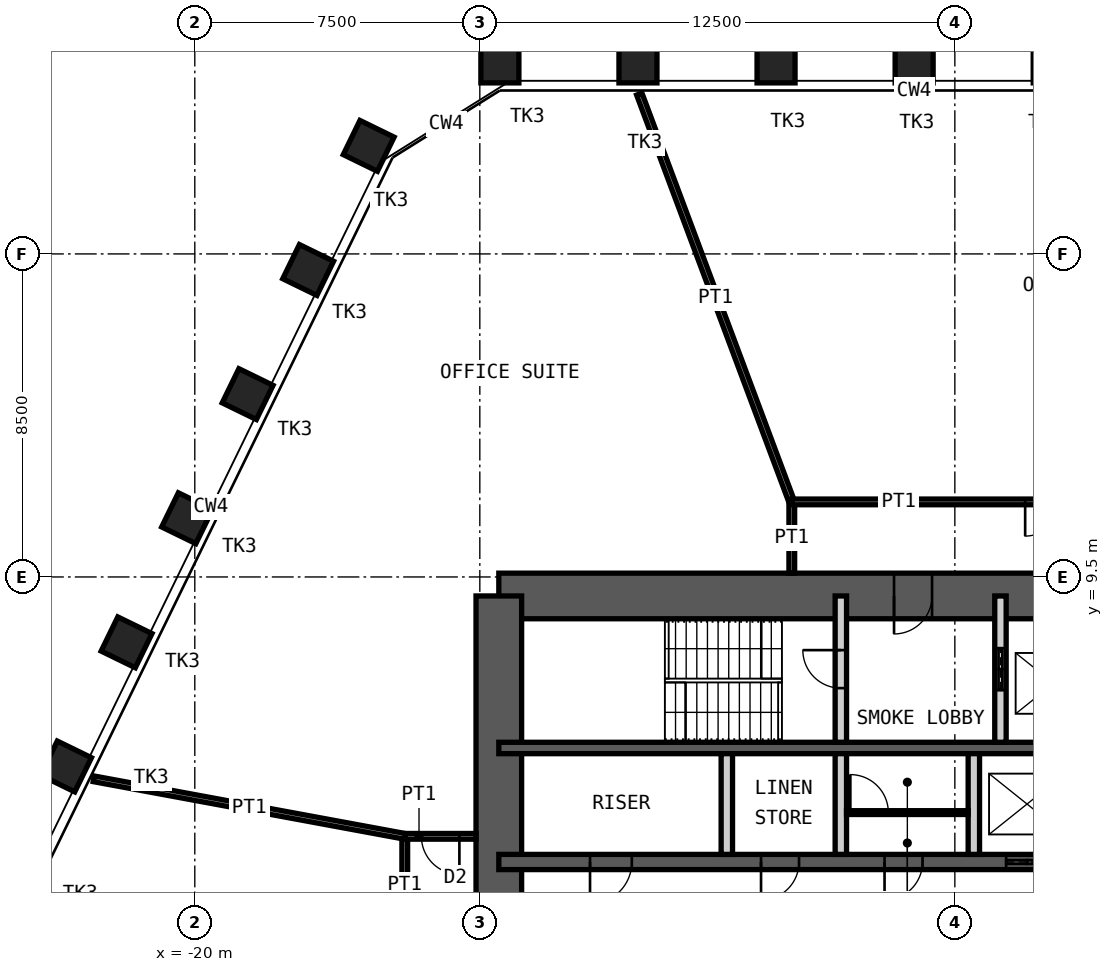
"""IFC4 building model, lengths in metres.
Left out: names, types, materials, properties, quantities, classifications, styles, units other than length and angle.
Written with IfcOpenShell. Run it as: python <this file> out.ifc"""

import sys

from ifc_helpers import new_model, si_unit, direction, frame, frame_2d, origin, origin_2d, place, context, subcontext, project, spatial, rectangle, hollow_rectangle, extrude, element, fill, save


model = new_model("IFC4")
c1 = context("Model", 3, precision=1e-05, world=origin(), true_north=direction((0.0, 1.0)))
c2 = subcontext(c1, "Body", "Model", "MODEL_VIEW")
j1 = project(units=[si_unit("LENGTHUNIT", "METRE"), si_unit("PLANEANGLEUNIT", "RADIAN")], contexts=[c1])
p1 = place(None, origin())
s1 = spatial("IfcSite", under=j1, at=p1, CompositionType="ELEMENT")
p2 = place(p1, origin())
s2 = spatial("IfcBuilding", under=s1, at=p2, CompositionType="ELEMENT")
p3 = place(p2, frame((0.0, 0.0, 251.8)))
s3 = spatial("IfcBuildingStorey", under=s2, at=p3, CompositionType="ELEMENT", Elevation=251.8)
for number, where, z_axis, x_axis in (
    (1, (-11.972, 23.0, 0.0), (0.0, 0.0, 1.0), (-1.0, 0.0, 0.0)),
    (2, (-8.338, 23.0, 0.0), (0.0, 0.0, 1.0), (-1.0, 0.0, 0.0)),
    (3, (-4.705, 23.0, 0.0), (0.0, 0.0, 1.0), (-1.0, 0.0, 0.0)),
    (4, (-1.071, 23.0, 0.0), (0.0, 0.0, 1.0), (-1.0, 0.0, 0.0)),
    (5, (-23.388, 4.514, 0.0), (0.0, 0.0, 1.0), (-0.438, -0.899, 0.0)),
    (6, (-21.795, 7.78, 0.0), (0.0, 0.0, 1.0), (-0.438, -0.899, 0.0)),
    (7, (-20.203, 11.045, 0.0), (0.0, 0.0, 1.0), (-0.438, -0.899, 0.0)),
    (8, (-18.61, 14.311, 0.0), (0.0, 0.0, 1.0), (-0.438, -0.899, 0.0)),
    (9, (-17.017, 17.577, 0.0), (0.0, 0.0, 1.0), (-0.438, -0.899, 0.0)),
    (10, (-15.424, 20.843, 0.0), (0.0, 0.0, 1.0), (-0.438, -0.899, 0.0)),
):
    element("IfcColumn", number, at=place(p3, frame(where, z_axis=z_axis, x_axis=x_axis)), inside=s3, PredefinedType="COLUMN", context=c2, shape_type="SweptSolid", body=[
        extrude(hollow_rectangle(XDim=1.0, YDim=1.0, WallThickness=0.08, at=origin_2d()), origin(), (0.0, 0.0, 1.0), 4.2),
    ])
p4 = place(p3, frame((-12.0, 9.0, 0.0), z_axis=(0.0, 0.0, 1.0), x_axis=(1.0, 0.0, 0.0)))
e11 = element("IfcWall", 11, at=p4, inside=s3, PredefinedType="SHEAR", context=c2, shape_type="SweptSolid", body=[
    extrude(rectangle(XDim=24.0, YDim=1.2, at=frame_2d((12.0, 0.0))), origin(), (0.0, 0.0, 1.0), 4.2),
])
p5 = place(p4, frame((10.4, 0.0, 0.0)))
e12 = element("IfcOpeningElement", 12, at=p5, cuts=e11, PredefinedType="OPENING", context=c2, shape_type="SweptSolid", body=[
    extrude(rectangle(XDim=1.0, YDim=2.1, at=frame_2d((0.5, 1.05))), frame((0.0, 0.61, 0.0), z_axis=(0.0, -1.0, 0.0), x_axis=(1.0, 0.0, 0.0)), (0.0, 0.0, 1.0), 1.22),
])
p6 = place(p4, frame((17.6, 0.0, 0.0)))
e13 = element("IfcOpeningElement", 13, at=p6, cuts=e11, PredefinedType="OPENING", context=c2, shape_type="SweptSolid", body=[
    extrude(rectangle(XDim=0.9, YDim=2.1, at=frame_2d((0.45, 1.05))), frame((0.0, 0.61, 0.0), z_axis=(0.0, -1.0, 0.0), x_axis=(1.0, 0.0, 0.0)), (0.0, 0.0, 1.0), 1.22),
])
p7 = place(p4, frame((21.9, 0.0, 0.0)))
e14 = element("IfcOpeningElement", 14, at=p7, cuts=e11, PredefinedType="OPENING", context=c2, shape_type="SweptSolid", body=[
    extrude(rectangle(XDim=0.9, YDim=2.1, at=frame_2d((0.45, 1.05))), frame((0.0, 0.61, 0.0), z_axis=(0.0, -1.0, 0.0), x_axis=(1.0, 0.0, 0.0)), (0.0, 0.0, 1.0), 1.22),
])
p8 = place(p3, frame((-12.0, -9.0, 0.0), z_axis=(0.0, 0.0, 1.0), x_axis=(0.0, 1.0, 0.0)))
e15 = element("IfcWall", 15, at=p8, inside=s3, PredefinedType="SHEAR", context=c2, shape_type="SweptSolid", body=[
    extrude(rectangle(XDim=18.0, YDim=1.2, at=frame_2d((9.0, 0.0))), origin(), (0.0, 0.0, 1.0), 4.2),
])
p9 = place(p8, frame((8.1, 0.0, 0.0)))
e16 = element("IfcOpeningElement", 16, at=p9, cuts=e15, PredefinedType="OPENING", context=c2, shape_type="SweptSolid", body=[
    extrude(rectangle(XDim=1.8, YDim=2.1, at=frame_2d((0.9, 1.05))), frame((0.0, 0.61, 0.0), z_axis=(0.0, -1.0, 0.0), x_axis=(1.0, 0.0, 0.0)), (0.0, 0.0, 1.0), 1.22),
])
p10 = place(p3, frame((-12.0, 5.0, 0.0), z_axis=(0.0, 0.0, 1.0), x_axis=(1.0, 0.0, 0.0)))
e17 = element("IfcWall", 17, at=p10, inside=s3, PredefinedType="SHEAR", context=c2, shape_type="SweptSolid", body=[
    extrude(rectangle(XDim=24.0, YDim=0.3, at=frame_2d((12.0, 0.0))), origin(), (0.0, 0.0, 1.0), 4.2),
])
p11 = place(p3, frame((-12.0, 2.0, 0.0), z_axis=(0.0, 0.0, 1.0), x_axis=(1.0, 0.0, 0.0)))
e18 = element("IfcWall", 18, at=p11, inside=s3, PredefinedType="SHEAR", context=c2, shape_type="SweptSolid", body=[
    extrude(rectangle(XDim=24.0, YDim=0.4, at=frame_2d((12.0, 0.0))), origin(), (0.0, 0.0, 1.0), 4.2),
])
p12 = place(p11, frame((2.4, 0.0, 0.0)))
e19 = element("IfcOpeningElement", 19, at=p12, cuts=e18, PredefinedType="OPENING", context=c2, shape_type="SweptSolid", body=[
    extrude(rectangle(XDim=1.1, YDim=2.1, at=frame_2d((0.55, 1.05))), frame((0.0, 0.21, 0.0), z_axis=(0.0, -1.0, 0.0), x_axis=(1.0, 0.0, 0.0)), (0.0, 0.0, 1.0), 0.42),
])
p13 = place(p11, frame((22.0, 0.0, 0.0)))
e20 = element("IfcOpeningElement", 20, at=p13, cuts=e18, PredefinedType="OPENING", context=c2, shape_type="SweptSolid", body=[
    extrude(rectangle(XDim=1.1, YDim=2.1, at=frame_2d((0.55, 1.05))), frame((0.0, 0.21, 0.0), z_axis=(0.0, -1.0, 0.0), x_axis=(1.0, 0.0, 0.0)), (0.0, 0.0, 1.0), 0.42),
])
p14 = place(p11, frame((10.15, 0.0, 0.0)))
e21 = element("IfcOpeningElement", 21, at=p14, cuts=e18, PredefinedType="OPENING", context=c2, shape_type="SweptSolid", body=[
    extrude(rectangle(XDim=1.0, YDim=2.1, at=frame_2d((0.5, 1.05))), frame((0.0, 0.21, 0.0), z_axis=(0.0, -1.0, 0.0), x_axis=(1.0, 0.0, 0.0)), (0.0, 0.0, 1.0), 0.42),
])
p15 = place(p11, frame((6.9, 0.0, 0.0)))
e22 = element("IfcOpeningElement", 22, at=p15, cuts=e18, PredefinedType="OPENING", context=c2, shape_type="SweptSolid", body=[
    extrude(rectangle(XDim=1.0, YDim=2.1, at=frame_2d((0.5, 1.05))), frame((0.0, 0.21, 0.0), z_axis=(0.0, -1.0, 0.0), x_axis=(1.0, 0.0, 0.0)), (0.0, 0.0, 1.0), 0.42),
])
p16 = place(p11, frame((13.35, 0.0, 0.0)))
e23 = element("IfcOpeningElement", 23, at=p16, cuts=e18, PredefinedType="OPENING", context=c2, shape_type="SweptSolid", body=[
    extrude(rectangle(XDim=1.1, YDim=2.4, at=frame_2d((0.55, 1.2))), frame((0.0, 0.21, 0.0), z_axis=(0.0, -1.0, 0.0), x_axis=(1.0, 0.0, 0.0)), (0.0, 0.0, 1.0), 0.42),
])
p17 = place(p11, frame((16.15, 0.0, 0.0)))
e24 = element("IfcOpeningElement", 24, at=p17, cuts=e18, PredefinedType="OPENING", context=c2, shape_type="SweptSolid", body=[
    extrude(rectangle(XDim=1.1, YDim=2.4, at=frame_2d((0.55, 1.2))), frame((0.0, 0.21, 0.0), z_axis=(0.0, -1.0, 0.0), x_axis=(1.0, 0.0, 0.0)), (0.0, 0.0, 1.0), 0.42),
])
p18 = place(p11, frame((18.95, 0.0, 0.0)))
e25 = element("IfcOpeningElement", 25, at=p18, cuts=e18, PredefinedType="OPENING", context=c2, shape_type="SweptSolid", body=[
    extrude(rectangle(XDim=1.1, YDim=2.4, at=frame_2d((0.55, 1.2))), frame((0.0, 0.21, 0.0), z_axis=(0.0, -1.0, 0.0), x_axis=(1.0, 0.0, 0.0)), (0.0, 0.0, 1.0), 0.42),
])
p19 = place(p3, frame((-3.0, 5.15, 0.0), z_axis=(0.0, 0.0, 1.0), x_axis=(0.0, 1.0, 0.0)))
e26 = element("IfcWall", 26, at=p19, inside=s3, PredefinedType="PARTITIONING", context=c2, shape_type="SweptSolid", body=[
    extrude(rectangle(XDim=3.85, YDim=0.3, at=frame_2d((1.925, 0.0))), origin(), (0.0, 0.0, 1.0), 3.98),
])
p20 = place(p19, frame((1.425, 0.0, 0.0)))
e27 = element("IfcOpeningElement", 27, at=p20, cuts=e26, PredefinedType="OPENING", context=c2, shape_type="SweptSolid", body=[
    extrude(rectangle(XDim=1.0, YDim=2.1, at=frame_2d((0.5, 1.05))), frame((0.0, 0.16, 0.0), z_axis=(0.0, -1.0, 0.0), x_axis=(1.0, 0.0, 0.0)), (0.0, 0.0, 1.0), 0.32),
])
p21 = place(p3, frame((1.2, 5.15, 0.0), z_axis=(0.0, 0.0, 1.0), x_axis=(0.0, 1.0, 0.0)))
e28 = element("IfcWall", 28, at=p21, inside=s3, PredefinedType="PARTITIONING", context=c2, shape_type="SweptSolid", body=[
    extrude(rectangle(XDim=3.85, YDim=0.3, at=frame_2d((1.925, 0.0))), origin(), (0.0, 0.0, 1.0), 3.98),
])
p22 = place(p21, frame((1.375, 0.0, 0.0)))
e29 = element("IfcOpeningElement", 29, at=p22, cuts=e28, PredefinedType="OPENING", context=c2, shape_type="SweptSolid", body=[
    extrude(rectangle(XDim=1.1, YDim=2.4, at=frame_2d((0.55, 1.2))), frame((0.0, 0.16, 0.0), z_axis=(0.0, -1.0, 0.0), x_axis=(1.0, 0.0, 0.0)), (0.0, 0.0, 1.0), 0.32),
])
for number, where, z_axis, x_axis in (
    (30, (-6.0, 2.2, 0.0), (0.0, 0.0, 1.0), (0.0, 1.0, 0.0)),
    (31, (-3.0, 2.2, 0.0), (0.0, 0.0, 1.0), (0.0, 1.0, 0.0)),
    (32, (0.5, 2.2, 0.0), (0.0, 0.0, 1.0), (0.0, 1.0, 0.0)),
):
    element("IfcWall", number, at=place(p3, frame(where, z_axis=z_axis, x_axis=x_axis)), inside=s3, PredefinedType="PARTITIONING", context=c2, shape_type="SweptSolid", body=[
        extrude(rectangle(XDim=2.65, YDim=0.3, at=frame_2d((1.325, 0.0))), origin(), (0.0, 0.0, 1.0), 3.98),
    ])
p23 = place(p3, frame((-2.85, 3.3, 0.0), z_axis=(0.0, 0.0, 1.0), x_axis=(1.0, 0.0, 0.0)))
e33 = element("IfcWall", 33, at=p23, inside=s3, PredefinedType="PARTITIONING", context=c2, shape_type="SweptSolid", body=[
    extrude(rectangle(XDim=3.2, YDim=0.1, at=frame_2d((1.6, 0.0))), origin(), (0.0, 0.0, 1.0), 3.98),
])
p24 = place(p23, frame((0.1, 0.0, 0.0)))
e34 = element("IfcOpeningElement", 34, at=p24, cuts=e33, PredefinedType="OPENING", context=c2, shape_type="SweptSolid", body=[
    extrude(rectangle(XDim=1.0, YDim=2.4, at=frame_2d((0.5, 1.2))), frame((0.0, 0.06, 0.0), z_axis=(0.0, -1.0, 0.0), x_axis=(1.0, 0.0, 0.0)), (0.0, 0.0, 1.0), 0.12),
])
p25 = place(p3, frame((-14.475, -3.736, 0.0), z_axis=(0.0, 0.0, 1.0), x_axis=(0.0, 1.0, 0.0)))
e35 = element("IfcWall", 35, at=p25, inside=s3, PredefinedType="PARTITIONING", context=c2, shape_type="SweptSolid", body=[
    extrude(rectangle(XDim=6.412, YDim=0.15, at=frame_2d((3.206, 0.0))), origin(), (0.0, 0.0, 1.0), 3.92),
])
p26 = place(p25, frame((2.706, 0.0, 0.0)))
e36 = element("IfcOpeningElement", 36, at=p26, cuts=e35, PredefinedType="OPENING", context=c2, shape_type="SweptSolid", body=[
    extrude(rectangle(XDim=1.0, YDim=2.4, at=frame_2d((0.5, 1.2))), frame((0.0, 0.085, 0.0), z_axis=(0.0, -1.0, 0.0), x_axis=(1.0, 0.0, 0.0)), (0.0, 0.0, 1.0), 0.17),
])
p27 = place(p3, frame((-22.661, 4.189, 0.0), z_axis=(0.0, 0.0, 1.0), x_axis=(0.983345347199, -0.181746879316, 0.0)))
e37 = element("IfcWall", 37, at=p27, inside=s3, PredefinedType="PARTITIONING", context=c2, shape_type="SweptSolid", body=[
    extrude(rectangle(XDim=8.324, YDim=0.15, at=frame_2d((4.162, 0.0))), origin(), (0.0, 0.0, 1.0), 2.72),
])
p28 = place(p3, frame((-14.475, 2.676, 0.0), z_axis=(0.0, 0.0, 1.0), x_axis=(1.0, 0.0, 0.0)))
e38 = element("IfcWall", 38, at=p28, inside=s3, PredefinedType="PARTITIONING", context=c2, shape_type="SweptSolid", body=[
    extrude(rectangle(XDim=1.875, YDim=0.15, at=frame_2d((0.938, 0.0))), origin(), (0.0, 0.0, 1.0), 2.72),
])
p29 = place(p28, frame((0.438, 0.0, 0.0)))
e39 = element("IfcOpeningElement", 39, at=p29, cuts=e38, PredefinedType="OPENING", context=c2, shape_type="SweptSolid", body=[
    extrude(rectangle(XDim=1.0, YDim=2.4, at=frame_2d((0.5, 1.2))), frame((0.0, 0.085, 0.0), z_axis=(0.0, -1.0, 0.0), x_axis=(1.0, 0.0, 0.0)), (0.0, 0.0, 1.0), 0.17),
])
p30 = place(p3, frame((-4.291, 9.6, 0.0), z_axis=(0.0, 0.0, 1.0), x_axis=(0.0, 1.0, 0.0)))
e40 = element("IfcWall", 40, at=p30, inside=s3, PredefinedType="PARTITIONING", context=c2, shape_type="SweptSolid", body=[
    extrude(rectangle(XDim=1.875, YDim=0.15, at=frame_2d((0.938, 0.0))), origin(), (0.0, 0.0, 1.0), 3.92),
])
p31 = place(p3, frame((-8.303, 22.206, 0.0), z_axis=(0.0, 0.0, 1.0), x_axis=(0.350242883069, -0.936658914899, 0.0)))
e41 = element("IfcWall", 41, at=p31, inside=s3, PredefinedType="PARTITIONING", context=c2, shape_type="SweptSolid", body=[
    extrude(rectangle(XDim=11.457, YDim=0.15, at=frame_2d((5.729, 0.0))), origin(), (0.0, 0.0, 1.0), 2.72),
])
p32 = place(p3, frame((-4.291, 11.475, 0.0), z_axis=(0.0, 0.0, 1.0), x_axis=(1.0, 0.0, 0.0)))
e42 = element("IfcWall", 42, at=p32, inside=s3, PredefinedType="PARTITIONING", context=c2, shape_type="SweptSolid", body=[
    extrude(rectangle(XDim=14.082, YDim=0.15, at=frame_2d((7.041, 0.0))), origin(), (0.0, 0.0, 1.0), 3.92),
])
p33 = place(p32, frame((6.141, 0.0, 0.0)))
e43 = element("IfcOpeningElement", 43, at=p33, cuts=e42, PredefinedType="OPENING", context=c2, shape_type="SweptSolid", body=[
    extrude(rectangle(XDim=1.8, YDim=2.4, at=frame_2d((0.9, 1.2))), frame((0.0, 0.085, 0.0), z_axis=(0.0, -1.0, 0.0), x_axis=(1.0, 0.0, 0.0)), (0.0, 0.0, 1.0), 0.17),
])
p34 = place(p5, origin())
e44 = element("IfcDoor", 44, at=p34, inside=s3, OperationType="SINGLE_SWING_LEFT", PredefinedType="DOOR", context=c2, shape_type="SweptSolid", body=[
    extrude(rectangle(XDim=1.0, YDim=2.1, at=frame_2d((0.5, 1.05))), frame((0.0, 0.025, 0.0), z_axis=(0.0, -1.0, 0.0), x_axis=(1.0, 0.0, 0.0)), (0.0, 0.0, 1.0), 0.05),
])
fill(e12, e44)
p35 = place(p20, origin())
e45 = element("IfcDoor", 45, at=p35, inside=s3, OperationType="SINGLE_SWING_LEFT", PredefinedType="DOOR", context=c2, shape_type="SweptSolid", body=[
    extrude(rectangle(XDim=1.0, YDim=2.1, at=frame_2d((0.5, 1.05))), frame((0.0, 0.025, 0.0), z_axis=(0.0, -1.0, 0.0), x_axis=(1.0, 0.0, 0.0)), (0.0, 0.0, 1.0), 0.05),
])
fill(e27, e45)
p36 = place(p12, origin())
e46 = element("IfcDoor", 46, at=p36, inside=s3, OperationType="SINGLE_SWING_LEFT", PredefinedType="DOOR", context=c2, shape_type="SweptSolid", body=[
    extrude(rectangle(XDim=1.1, YDim=2.1, at=frame_2d((0.55, 1.05))), frame((0.0, 0.025, 0.0), z_axis=(0.0, -1.0, 0.0), x_axis=(1.0, 0.0, 0.0)), (0.0, 0.0, 1.0), 0.05),
])
fill(e19, e46)
p37 = place(p14, origin())
e47 = element("IfcDoor", 47, at=p37, inside=s3, OperationType="SINGLE_SWING_LEFT", PredefinedType="DOOR", context=c2, shape_type="SweptSolid", body=[
    extrude(rectangle(XDim=1.0, YDim=2.1, at=frame_2d((0.5, 1.05))), frame((0.0, 0.025, 0.0), z_axis=(0.0, -1.0, 0.0), x_axis=(1.0, 0.0, 0.0)), (0.0, 0.0, 1.0), 0.05),
])
fill(e21, e47)
p38 = place(p22, origin())
e48 = element("IfcDoor", 48, at=p38, inside=s3, OperationType="DOUBLE_DOOR_SLIDING", PredefinedType="DOOR", context=c2, shape_type="SweptSolid", body=[
    extrude(rectangle(XDim=1.1, YDim=2.4, at=frame_2d((0.55, 1.2))), frame((0.0, 0.025, 0.0), z_axis=(0.0, -1.0, 0.0), x_axis=(1.0, 0.0, 0.0)), (0.0, 0.0, 1.0), 0.05),
])
fill(e29, e48)
p39 = place(p15, origin())
e49 = element("IfcDoor", 49, at=p39, inside=s3, OperationType="SINGLE_SWING_LEFT", PredefinedType="DOOR", context=c2, shape_type="SweptSolid", body=[
    extrude(rectangle(XDim=1.0, YDim=2.1, at=frame_2d((0.5, 1.05))), frame((0.0, 0.025, 0.0), z_axis=(0.0, -1.0, 0.0), x_axis=(1.0, 0.0, 0.0)), (0.0, 0.0, 1.0), 0.05),
])
fill(e22, e49)
p40 = place(p16, origin())
e50 = element("IfcDoor", 50, at=p40, inside=s3, OperationType="DOUBLE_DOOR_SLIDING", PredefinedType="DOOR", context=c2, shape_type="SweptSolid", body=[
    extrude(rectangle(XDim=1.1, YDim=2.4, at=frame_2d((0.55, 1.2))), frame((0.0, 0.025, 0.0), z_axis=(0.0, -1.0, 0.0), x_axis=(1.0, 0.0, 0.0)), (0.0, 0.0, 1.0), 0.05),
])
fill(e23, e50)
p41 = place(p24, origin())
e51 = element("IfcDoor", 51, at=p41, inside=s3, OperationType="SINGLE_SWING_RIGHT", PredefinedType="DOOR", context=c2, shape_type="SweptSolid", body=[
    extrude(rectangle(XDim=1.0, YDim=2.4, at=frame_2d((0.5, 1.2))), frame((0.0, 0.025, 0.0), z_axis=(0.0, -1.0, 0.0), x_axis=(1.0, 0.0, 0.0)), (0.0, 0.0, 1.0), 0.05),
])
fill(e34, e51)
p42 = place(p29, origin())
e52 = element("IfcDoor", 52, at=p42, inside=s3, OperationType="SINGLE_SWING_RIGHT", PredefinedType="DOOR", context=c2, shape_type="SweptSolid", body=[
    extrude(rectangle(XDim=1.0, YDim=2.4, at=frame_2d((0.5, 1.2))), frame((0.0, 0.025, 0.0), z_axis=(0.0, -1.0, 0.0), x_axis=(1.0, 0.0, 0.0)), (0.0, 0.0, 1.0), 0.05),
])
fill(e39, e52)
p43 = place(p33, origin())
e53 = element("IfcDoor", 53, at=p43, inside=s3, OperationType="DOUBLE_DOOR_DOUBLE_SWING", PredefinedType="DOOR", context=c2, shape_type="SweptSolid", body=[
    extrude(rectangle(XDim=1.8, YDim=2.4, at=frame_2d((0.9, 1.2))), frame((0.0, 0.025, 0.0), z_axis=(0.0, -1.0, 0.0), x_axis=(1.0, 0.0, 0.0)), (0.0, 0.0, 1.0), 0.05),
])
fill(e43, e53)
save(model, sys.argv[1])
